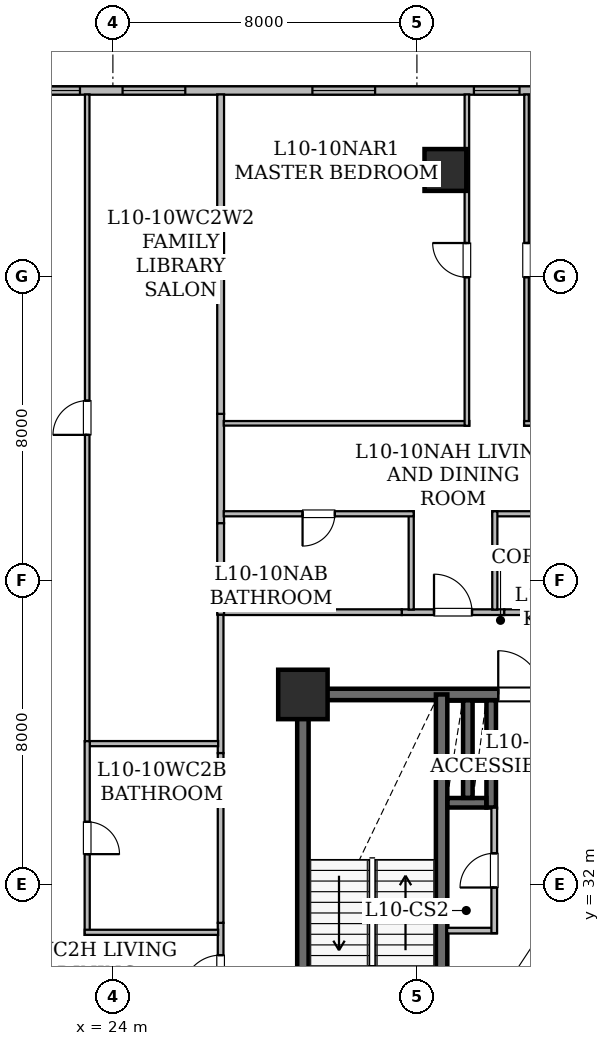
"""IFC4 building model, lengths in metres.
Left out: names, types, materials, properties, quantities, classifications, styles, units other than length and angle.
Written with IfcOpenShell. Run it as: python <this file> out.ifc"""

import sys

from ifc_helpers import new_model, si_unit, direction, frame, frame_2d, origin, origin_2d, place, context, subcontext, project, spatial, rectangle, hollow_rectangle, extrude, element, fill, save


model = new_model("IFC4")
c1 = context("Model", 3, precision=1e-05, world=origin(), true_north=direction((0.0, 1.0)))
c2 = subcontext(c1, "Body", "Model", "MODEL_VIEW")
j1 = project(units=[si_unit("LENGTHUNIT", "METRE"), si_unit("PLANEANGLEUNIT", "RADIAN")], contexts=[c1])
p1 = place(None, origin())
s1 = spatial("IfcSite", under=j1, at=p1, CompositionType="ELEMENT")
p2 = place(p1, origin())
s2 = spatial("IfcBuilding", under=s1, at=p2, CompositionType="ELEMENT")
p3 = place(p2, frame((0.0, 0.0, 44.25)))
s3 = spatial("IfcBuildingStorey", under=s2, at=p3, CompositionType="ELEMENT", Elevation=44.25)
p4 = place(p3, frame((29.0, 37.0, 0.0), z_axis=(0.0, 0.0, 1.0), x_axis=(1.0, 0.0, 0.0)))
e1 = element("IfcColumn", 1, at=p4, inside=s3, PredefinedType="COLUMN", context=c2, shape_type="SweptSolid", body=[
    extrude(hollow_rectangle(XDim=1.3, YDim=1.3, WallThickness=0.065, at=origin_2d()), origin(), (0.0, 0.0, 1.0), 3.65),
])
p5 = place(p3, frame((32.75, 50.8, 0.0), z_axis=(0.0, 0.0, 1.0), x_axis=(1.0, 0.0, 0.0)))
e2 = element("IfcColumn", 2, at=p5, inside=s3, PredefinedType="COLUMN", context=c2, shape_type="SweptSolid", body=[
    extrude(hollow_rectangle(XDim=1.1, YDim=1.1, WallThickness=0.055, at=origin_2d()), origin(), (0.0, 0.0, 1.0), 3.65),
])
p6 = place(p3, frame((8.315, 52.89, 0.0), z_axis=(0.0, 0.0, 1.0), x_axis=(1.0, 0.0, 0.0)))
e3 = element("IfcWall", 3, at=p6, inside=s3, PredefinedType="STANDARD", context=c2, shape_type="SweptSolid", body=[
    extrude(rectangle(XDim=37.439, YDim=0.22, at=frame_2d((18.719, 0.0))), origin(), (0.0, 0.0, 1.0), 3.43),
])
p7 = place(p6, frame((3.164, 0.0, 0.85)))
e4 = element("IfcOpeningElement", 4, at=p7, cuts=e3, PredefinedType="OPENING", context=c2, shape_type="SweptSolid", body=[
    extrude(rectangle(XDim=1.65, YDim=1.55, at=frame_2d((0.825, 0.775))), frame((0.0, 0.12, 0.0), z_axis=(0.0, -1.0, 0.0), x_axis=(1.0, 0.0, 0.0)), (0.0, 0.0, 1.0), 0.24),
])
p8 = place(p6, frame((15.94, 0.0, 0.85)))
e5 = element("IfcOpeningElement", 5, at=p8, cuts=e3, PredefinedType="OPENING", context=c2, shape_type="SweptSolid", body=[
    extrude(rectangle(XDim=1.65, YDim=1.55, at=frame_2d((0.825, 0.775))), frame((0.0, 0.12, 0.0), z_axis=(0.0, -1.0, 0.0), x_axis=(1.0, 0.0, 0.0)), (0.0, 0.0, 1.0), 0.24),
])
p9 = place(p6, frame((13.619, 0.0, 0.8)))
e6 = element("IfcOpeningElement", 6, at=p9, cuts=e3, PredefinedType="OPENING", context=c2, shape_type="SweptSolid", body=[
    extrude(rectangle(XDim=1.2, YDim=1.5, at=frame_2d((0.6, 0.75))), frame((0.0, 0.12, 0.0), z_axis=(0.0, -1.0, 0.0), x_axis=(1.0, 0.0, 0.0)), (0.0, 0.0, 1.0), 0.24),
])
p10 = place(p6, frame((8.999, 0.0, 0.85)))
e7 = element("IfcOpeningElement", 7, at=p10, cuts=e3, PredefinedType="OPENING", context=c2, shape_type="SweptSolid", body=[
    extrude(rectangle(XDim=1.65, YDim=1.55, at=frame_2d((0.825, 0.775))), frame((0.0, 0.12, 0.0), z_axis=(0.0, -1.0, 0.0), x_axis=(1.0, 0.0, 0.0)), (0.0, 0.0, 1.0), 0.24),
])
p11 = place(p6, frame((25.185, 0.0, 0.8)))
e8 = element("IfcOpeningElement", 8, at=p11, cuts=e3, PredefinedType="OPENING", context=c2, shape_type="SweptSolid", body=[
    extrude(rectangle(XDim=1.2, YDim=1.5, at=frame_2d((0.6, 0.75))), frame((0.0, 0.12, 0.0), z_axis=(0.0, -1.0, 0.0), x_axis=(1.0, 0.0, 0.0)), (0.0, 0.0, 1.0), 0.24),
])
p12 = place(p6, frame((20.935, 0.0, 0.85)))
e9 = element("IfcOpeningElement", 9, at=p12, cuts=e3, PredefinedType="OPENING", context=c2, shape_type="SweptSolid", body=[
    extrude(rectangle(XDim=1.65, YDim=1.55, at=frame_2d((0.825, 0.775))), frame((0.0, 0.12, 0.0), z_axis=(0.0, -1.0, 0.0), x_axis=(1.0, 0.0, 0.0)), (0.0, 0.0, 1.0), 0.24),
])
p13 = place(p6, frame((28.985, 0.0, 0.85)))
e10 = element("IfcOpeningElement", 10, at=p13, cuts=e3, PredefinedType="OPENING", context=c2, shape_type="SweptSolid", body=[
    extrude(rectangle(XDim=1.65, YDim=1.55, at=frame_2d((0.825, 0.775))), frame((0.0, 0.12, 0.0), z_axis=(0.0, -1.0, 0.0), x_axis=(1.0, 0.0, 0.0)), (0.0, 0.0, 1.0), 0.24),
])
p14 = place(p6, frame((33.98, 0.0, 0.85)))
e11 = element("IfcOpeningElement", 11, at=p14, cuts=e3, PredefinedType="OPENING", context=c2, shape_type="SweptSolid", body=[
    extrude(rectangle(XDim=1.65, YDim=1.55, at=frame_2d((0.825, 0.775))), frame((0.0, 0.12, 0.0), z_axis=(0.0, -1.0, 0.0), x_axis=(1.0, 0.0, 0.0)), (0.0, 0.0, 1.0), 0.24),
])
p15 = place(p3, frame((29.0, 28.0, 0.0), z_axis=(0.0, 0.0, 1.0), x_axis=(0.0, 1.0, 0.0)))
e12 = element("IfcWall", 12, at=p15, inside=s3, PredefinedType="SHEAR", context=c2, shape_type="SweptSolid", body=[
    extrude(rectangle(XDim=9.0, YDim=0.3, at=frame_2d((4.5, 0.0))), origin(), (0.0, 0.0, 1.0), 3.43),
])
p16 = place(p3, frame((29.0, 37.0, 0.0), z_axis=(0.0, 0.0, 1.0), x_axis=(1.0, 0.0, 0.0)))
e13 = element("IfcWall", 13, at=p16, inside=s3, PredefinedType="SHEAR", context=c2, shape_type="SweptSolid", body=[
    extrude(rectangle(XDim=10.4, YDim=0.3, at=frame_2d((5.2, 0.0))), origin(), (0.0, 0.0, 1.0), 3.43),
])
p17 = place(p16, frame((5.14, 0.0, 0.0)))
e14 = element("IfcOpeningElement", 14, at=p17, cuts=e13, PredefinedType="OPENING", context=c2, shape_type="SweptSolid", body=[
    extrude(rectangle(XDim=1.15, YDim=2.2, at=frame_2d((0.575, 1.1))), frame((0.0, 0.16, 0.0), z_axis=(0.0, -1.0, 0.0), x_axis=(1.0, 0.0, 0.0)), (0.0, 0.0, 1.0), 0.32),
])
p18 = place(p3, frame((32.65, 28.0, 0.0), z_axis=(0.0, 0.0, 1.0), x_axis=(0.0, 1.0, 0.0)))
e15 = element("IfcWall", 15, at=p18, inside=s3, PredefinedType="SHEAR", context=c2, shape_type="SweptSolid", body=[
    extrude(rectangle(XDim=9.0, YDim=0.3, at=frame_2d((4.5, 0.0))), origin(), (0.0, 0.0, 1.0), 3.43),
])
p19 = place(p18, frame((0.72, 0.0, 0.0)))
e16 = element("IfcOpeningElement", 16, at=p19, cuts=e15, PredefinedType="OPENING", context=c2, shape_type="SweptSolid", body=[
    extrude(rectangle(XDim=1.0, YDim=2.15, at=frame_2d((0.5, 1.075))), frame((0.0, 0.16, 0.0), z_axis=(0.0, -1.0, 0.0), x_axis=(1.0, 0.0, 0.0)), (0.0, 0.0, 1.0), 0.32),
])
p20 = place(p3, frame((33.955, 34.025, 0.0), z_axis=(0.0, 0.0, 1.0), x_axis=(0.0, 1.0, 0.0)))
e17 = element("IfcWall", 17, at=p20, inside=s3, PredefinedType="SHEAR", context=c2, shape_type="SweptSolid", body=[
    extrude(rectangle(XDim=2.821, YDim=0.25, at=frame_2d((1.411, 0.0))), origin(), (0.0, 0.0, 1.0), 3.43),
])
p21 = place(p3, frame((32.804, 34.15, 0.0), z_axis=(0.0, 0.0, 1.0), x_axis=(1.0, 0.0, 0.0)))
e18 = element("IfcWall", 18, at=p21, inside=s3, PredefinedType="SHEAR", context=c2, shape_type="SweptSolid", body=[
    extrude(rectangle(XDim=1.022, YDim=0.25, at=frame_2d((0.511, 0.0))), origin(), (0.0, 0.0, 1.0), 3.43),
])
p22 = place(p3, frame((33.34, 34.279, 0.0), z_axis=(0.0, 0.0, 1.0), x_axis=(0.0, 1.0, 0.0)))
e19 = element("IfcWall", 19, at=p22, inside=s3, PredefinedType="SHEAR", context=c2, shape_type="SweptSolid", body=[
    extrude(rectangle(XDim=2.567, YDim=0.25, at=frame_2d((1.283, 0.0))), origin(), (0.0, 0.0, 1.0), 3.43),
])
p23 = place(p3, frame((32.794, 30.785, 0.0), z_axis=(0.0, 0.0, 1.0), x_axis=(1.0, 0.0, 0.0)))
e20 = element("IfcWall", 20, at=p23, inside=s3, PredefinedType="STANDARD", context=c2, shape_type="SweptSolid", body=[
    extrude(rectangle(XDim=1.306, YDim=0.15, at=frame_2d((0.653, 0.0))), origin(), (0.0, 0.0, 1.0), 2.887),
])
p24 = place(p3, frame((34.035, 30.72, 0.0), z_axis=(0.0, 0.0, 1.0), x_axis=(0.0, 1.0, 0.0)))
e21 = element("IfcWall", 21, at=p24, inside=s3, PredefinedType="STANDARD", context=c2, shape_type="SweptSolid", body=[
    extrude(rectangle(XDim=3.3, YDim=0.15, at=frame_2d((1.65, 0.0))), origin(), (0.0, 0.0, 1.0), 3.43),
])
p25 = place(p24, frame((1.2, 0.0, 0.0)))
e22 = element("IfcOpeningElement", 22, at=p25, cuts=e21, PredefinedType="OPENING", context=c2, shape_type="SweptSolid", body=[
    extrude(rectangle(XDim=0.9, YDim=2.1, at=frame_2d((0.45, 1.05))), frame((0.0, 0.085, 0.0), z_axis=(0.0, -1.0, 0.0), x_axis=(1.0, 0.0, 0.0)), (0.0, 0.0, 1.0), 0.17),
])
p26 = place(p3, frame((26.835, 35.457, 0.0), z_axis=(0.0, 0.0, 1.0), x_axis=(0.0, 1.0, 0.0)))
e23 = element("IfcWall", 23, at=p26, inside=s3, PredefinedType="STANDARD", context=c2, shape_type="SweptSolid", body=[
    extrude(rectangle(XDim=3.643, YDim=0.15, at=frame_2d((1.822, 0.0))), origin(), (0.0, 0.0, 1.0), 2.647),
])
p27 = place(p3, frame((26.835, 28.292, 0.0), z_axis=(0.0, 0.0, 1.0), x_axis=(0.0, 1.0, 0.0)))
e24 = element("IfcWall", 24, at=p27, inside=s3, PredefinedType="STANDARD", context=c2, shape_type="SweptSolid", body=[
    extrude(rectangle(XDim=2.698, YDim=0.15, at=frame_2d((1.349, 0.0))), origin(), (0.0, 0.0, 1.0), 3.43),
])
p28 = place(p27, frame((0.849, 0.0, 0.0)))
e25 = element("IfcOpeningElement", 25, at=p28, cuts=e24, PredefinedType="OPENING", context=c2, shape_type="SweptSolid", body=[
    extrude(rectangle(XDim=1.0, YDim=2.15, at=frame_2d((0.5, 1.075))), frame((0.0, 0.085, 0.0), z_axis=(0.0, -1.0, 0.0), x_axis=(1.0, 0.0, 0.0)), (0.0, 0.0, 1.0), 0.17),
])
p29 = place(p3, frame((26.835, 30.99, 0.0), z_axis=(0.0, 0.0, 1.0), x_axis=(0.0, 1.0, 0.0)))
e26 = element("IfcWall", 26, at=p29, inside=s3, PredefinedType="STANDARD", context=c2, shape_type="SweptSolid", body=[
    extrude(rectangle(XDim=4.467, YDim=0.15, at=frame_2d((2.233, 0.0))), origin(), (0.0, 0.0, 1.0), 3.43),
])
p30 = place(p3, frame((31.601, 39.165, 0.0), z_axis=(0.0, 0.0, 1.0), x_axis=(1.0, 0.0, 0.0)))
e27 = element("IfcWall", 27, at=p30, inside=s3, PredefinedType="STANDARD", context=c2, shape_type="SweptSolid", body=[
    extrude(rectangle(XDim=2.698, YDim=0.15, at=frame_2d((1.349, 0.0))), origin(), (0.0, 0.0, 1.0), 3.43),
])
p31 = place(p30, frame((0.849, 0.0, 0.0)))
e28 = element("IfcOpeningElement", 28, at=p31, cuts=e27, PredefinedType="OPENING", context=c2, shape_type="SweptSolid", body=[
    extrude(rectangle(XDim=1.0, YDim=2.15, at=frame_2d((0.5, 1.075))), frame((0.0, 0.085, 0.0), z_axis=(0.0, -1.0, 0.0), x_axis=(1.0, 0.0, 0.0)), (0.0, 0.0, 1.0), 0.17),
])
p32 = place(p3, frame((26.9, 39.165, 0.0), z_axis=(0.0, 0.0, 1.0), x_axis=(1.0, 0.0, 0.0)))
e29 = element("IfcWall", 29, at=p32, inside=s3, PredefinedType="STANDARD", context=c2, shape_type="SweptSolid", body=[
    extrude(rectangle(XDim=4.701, YDim=0.15, at=frame_2d((2.351, 0.0))), origin(), (0.0, 0.0, 1.0), 2.647),
])
p33 = place(p3, frame((34.299, 39.165, 0.0), z_axis=(0.0, 0.0, 1.0), x_axis=(1.0, 0.0, 0.0)))
e30 = element("IfcWall", 30, at=p33, inside=s3, PredefinedType="STANDARD", context=c2, shape_type="SweptSolid", body=[
    extrude(rectangle(XDim=7.001, YDim=0.15, at=frame_2d((3.5, 0.0))), origin(), (0.0, 0.0, 1.0), 3.43),
])
p34 = place(p3, frame((23.324, 35.771, 0.0), z_axis=(0.0, 0.0, 1.0), x_axis=(0.0, 1.0, 0.0)))
e31 = element("IfcWall", 31, at=p34, inside=s3, PredefinedType="PARTITIONING", context=c2, shape_type="SweptSolid", body=[
    extrude(rectangle(XDim=17.017, YDim=0.12, at=frame_2d((8.509, 0.0))), origin(), (0.0, 0.0, 1.0), 2.647),
])
p35 = place(p34, frame((8.059, 0.0, 0.0)))
e32 = element("IfcOpeningElement", 32, at=p35, cuts=e31, PredefinedType="OPENING", context=c2, shape_type="SweptSolid", body=[
    extrude(rectangle(XDim=0.9, YDim=2.1, at=frame_2d((0.45, 1.05))), frame((0.0, 0.07, 0.0), z_axis=(0.0, -1.0, 0.0), x_axis=(1.0, 0.0, 0.0)), (0.0, 0.0, 1.0), 0.14),
])
p36 = place(p3, frame((26.77, 35.706, 0.0), z_axis=(0.0, 0.0, 1.0), x_axis=(-1.0, 0.0, 0.0)))
e33 = element("IfcWall", 33, at=p36, inside=s3, PredefinedType="PARTITIONING", context=c2, shape_type="SweptSolid", body=[
    extrude(rectangle(XDim=3.381, YDim=0.135, at=frame_2d((1.69, 0.0))), origin(), (0.0, 0.0, 1.0), 3.43),
])
p37 = place(p3, frame((26.835, 44.383, 0.0), z_axis=(0.0, 0.0, 1.0), x_axis=(0.0, -1.0, 0.0)))
e34 = element("IfcWall", 34, at=p37, inside=s3, PredefinedType="STANDARD", context=c2, shape_type="SweptSolid", body=[
    extrude(rectangle(XDim=2.878, YDim=0.18, at=frame_2d((1.439, 0.0))), origin(), (0.0, 0.0, 1.0), 2.957),
])
p38 = place(p3, frame((26.835, 41.505, 0.0), z_axis=(0.0, 0.0, 1.0), x_axis=(0.0, -1.0, 0.0)))
e35 = element("IfcWall", 35, at=p38, inside=s3, PredefinedType="STANDARD", context=c2, shape_type="SweptSolid", body=[
    extrude(rectangle(XDim=2.405, YDim=0.18, at=frame_2d((1.202, 0.0))), origin(), (0.0, 0.0, 1.0), 3.43),
])
p39 = place(p3, frame((26.835, 52.788, 0.0), z_axis=(0.0, 0.0, 1.0), x_axis=(0.0, -1.0, 0.0)))
e36 = element("IfcWall", 36, at=p39, inside=s3, PredefinedType="STANDARD", context=c2, shape_type="SweptSolid", body=[
    extrude(rectangle(XDim=8.405, YDim=0.18, at=frame_2d((4.203, 0.0))), origin(), (0.0, 0.0, 1.0), 2.803),
])
p40 = place(p3, frame((23.324, 35.771, 0.0), z_axis=(0.0, 0.0, 1.0), x_axis=(0.0, -1.0, 0.0)))
e37 = element("IfcWall", 37, at=p40, inside=s3, PredefinedType="PARTITIONING", context=c2, shape_type="SweptSolid", body=[
    extrude(rectangle(XDim=5.095, YDim=0.135, at=frame_2d((2.547, 0.0))), origin(), (0.0, 0.0, 1.0), 3.43),
])
p41 = place(p40, frame((2.123, 0.0, 0.0)))
e38 = element("IfcOpeningElement", 38, at=p41, cuts=e37, PredefinedType="OPENING", context=c2, shape_type="SweptSolid", body=[
    extrude(rectangle(XDim=0.85, YDim=2.1, at=frame_2d((0.425, 1.05))), frame((0.0, 0.077, 0.0), z_axis=(0.0, -1.0, 0.0), x_axis=(1.0, 0.0, 0.0)), (0.0, 0.0, 1.0), 0.155),
])
p42 = place(p3, frame((23.259, 30.741, 0.0), z_axis=(0.0, 0.0, 1.0), x_axis=(1.0, 0.0, 0.0)))
e39 = element("IfcWall", 39, at=p42, inside=s3, PredefinedType="PARTITIONING", context=c2, shape_type="SweptSolid", body=[
    extrude(rectangle(XDim=3.511, YDim=0.135, at=frame_2d((1.755, 0.0))), origin(), (0.0, 0.0, 1.0), 3.43),
])
p43 = place(p3, frame((31.85, 39.232, 0.0), z_axis=(0.0, 0.0, 1.0), x_axis=(0.0, 1.0, 0.0)))
e40 = element("IfcWall", 40, at=p43, inside=s3, PredefinedType="PARTITIONING", context=c2, shape_type="SweptSolid", body=[
    extrude(rectangle(XDim=2.587, YDim=0.135, at=frame_2d((1.293, 0.0))), origin(), (0.0, 0.0, 1.0), 3.43),
])
p44 = place(p3, frame((31.915, 41.754, 0.0), z_axis=(0.0, 0.0, 1.0), x_axis=(-1.0, 0.0, 0.0)))
e41 = element("IfcWall", 41, at=p44, inside=s3, PredefinedType="PARTITIONING", context=c2, shape_type="SweptSolid", body=[
    extrude(rectangle(XDim=4.998, YDim=0.135, at=frame_2d((2.499, 0.0))), origin(), (0.0, 0.0, 1.0), 2.647),
])
p45 = place(p44, frame((2.074, 0.0, 0.0)))
e42 = element("IfcOpeningElement", 42, at=p45, cuts=e41, PredefinedType="OPENING", context=c2, shape_type="SweptSolid", body=[
    extrude(rectangle(XDim=0.85, YDim=2.1, at=frame_2d((0.425, 1.05))), frame((0.0, 0.077, 0.0), z_axis=(0.0, -1.0, 0.0), x_axis=(1.0, 0.0, 0.0)), (0.0, 0.0, 1.0), 0.155),
])
p46 = place(p3, frame((41.3, 41.754, 0.0), z_axis=(0.0, 0.0, 1.0), x_axis=(-1.0, 0.0, 0.0)))
e43 = element("IfcWall", 43, at=p46, inside=s3, PredefinedType="PARTITIONING", context=c2, shape_type="SweptSolid", body=[
    extrude(rectangle(XDim=7.315, YDim=0.135, at=frame_2d((3.657, 0.0))), origin(), (0.0, 0.0, 1.0), 3.43),
])
p47 = place(p46, frame((3.233, 0.0, 0.0)))
e44 = element("IfcOpeningElement", 44, at=p47, cuts=e43, PredefinedType="OPENING", context=c2, shape_type="SweptSolid", body=[
    extrude(rectangle(XDim=0.85, YDim=2.1, at=frame_2d((0.425, 1.05))), frame((0.0, 0.077, 0.0), z_axis=(0.0, -1.0, 0.0), x_axis=(1.0, 0.0, 0.0)), (0.0, 0.0, 1.0), 0.155),
])
p48 = place(p3, frame((34.05, 41.819, 0.0), z_axis=(0.0, 0.0, 1.0), x_axis=(0.0, -1.0, 0.0)))
e45 = element("IfcWall", 45, at=p48, inside=s3, PredefinedType="PARTITIONING", context=c2, shape_type="SweptSolid", body=[
    extrude(rectangle(XDim=2.587, YDim=0.135, at=frame_2d((1.293, 0.0))), origin(), (0.0, 0.0, 1.0), 3.43),
])
p49 = place(p3, frame((26.917, 44.134, 0.0), z_axis=(0.0, 0.0, 1.0), x_axis=(1.0, 0.0, 0.0)))
e46 = element("IfcWall", 46, at=p49, inside=s3, PredefinedType="PARTITIONING", context=c2, shape_type="SweptSolid", body=[
    extrude(rectangle(XDim=6.463, YDim=0.12, at=frame_2d((3.231, 0.0))), origin(), (0.0, 0.0, 1.0), 2.647),
])
p50 = place(p3, frame((33.315, 44.069, 0.0), z_axis=(0.0, 0.0, 1.0), x_axis=(0.0, 1.0, 0.0)))
e47 = element("IfcWall", 47, at=p50, inside=s3, PredefinedType="PARTITIONING", context=c2, shape_type="SweptSolid", body=[
    extrude(rectangle(XDim=8.719, YDim=0.12, at=frame_2d((4.359, 0.0))), origin(), (0.0, 0.0, 1.0), 2.803),
])
p51 = place(p50, frame((3.909, 0.0, 0.0)))
e48 = element("IfcOpeningElement", 48, at=p51, cuts=e47, PredefinedType="OPENING", context=c2, shape_type="SweptSolid", body=[
    extrude(rectangle(XDim=0.9, YDim=2.1, at=frame_2d((0.45, 1.05))), frame((0.0, 0.07, 0.0), z_axis=(0.0, -1.0, 0.0), x_axis=(1.0, 0.0, 0.0)), (0.0, 0.0, 1.0), 0.14),
])
p52 = place(p3, frame((34.885, 52.788, 0.0), z_axis=(0.0, 0.0, 1.0), x_axis=(0.0, -1.0, 0.0)))
e49 = element("IfcWall", 49, at=p52, inside=s3, PredefinedType="PARTITIONING", context=c2, shape_type="SweptSolid", body=[
    extrude(rectangle(XDim=8.719, YDim=0.12, at=frame_2d((4.359, 0.0))), origin(), (0.0, 0.0, 1.0), 2.803),
])
p53 = place(p52, frame((3.909, 0.0, 0.0)))
e50 = element("IfcOpeningElement", 50, at=p53, cuts=e49, PredefinedType="OPENING", context=c2, shape_type="SweptSolid", body=[
    extrude(rectangle(XDim=0.9, YDim=2.1, at=frame_2d((0.45, 1.05))), frame((0.0, 0.07, 0.0), z_axis=(0.0, -1.0, 0.0), x_axis=(1.0, 0.0, 0.0)), (0.0, 0.0, 1.0), 0.14),
])
p54 = place(p3, frame((34.82, 44.134, 0.0), z_axis=(0.0, 0.0, 1.0), x_axis=(1.0, 0.0, 0.0)))
e51 = element("IfcWall", 51, at=p54, inside=s3, PredefinedType="PARTITIONING", context=c2, shape_type="SweptSolid", body=[
    extrude(rectangle(XDim=6.48, YDim=0.12, at=frame_2d((3.24, 0.0))), origin(), (0.0, 0.0, 1.0), 3.43),
])
p55 = place(p8, origin())
e52 = element("IfcWindow", 52, at=p55, inside=s3, PartitioningType="SINGLE_PANEL", PredefinedType="WINDOW", context=c2, shape_type="SweptSolid", body=[
    extrude(rectangle(XDim=1.65, YDim=1.55, at=frame_2d((0.825, 0.775))), frame((0.0, 0.03, 0.0), z_axis=(0.0, -1.0, 0.0), x_axis=(1.0, 0.0, 0.0)), (0.0, 0.0, 1.0), 0.06),
])
fill(e5, e52)
p56 = place(p9, origin())
e53 = element("IfcWindow", 53, at=p56, inside=s3, PartitioningType="SINGLE_PANEL", PredefinedType="WINDOW", context=c2, shape_type="SweptSolid", body=[
    extrude(rectangle(XDim=1.2, YDim=1.5, at=frame_2d((0.6, 0.75))), frame((0.0, 0.03, 0.0), z_axis=(0.0, -1.0, 0.0), x_axis=(1.0, 0.0, 0.0)), (0.0, 0.0, 1.0), 0.06),
])
fill(e6, e53)
p57 = place(p11, origin())
e54 = element("IfcWindow", 54, at=p57, inside=s3, PartitioningType="SINGLE_PANEL", PredefinedType="WINDOW", context=c2, shape_type="SweptSolid", body=[
    extrude(rectangle(XDim=1.2, YDim=1.5, at=frame_2d((0.6, 0.75))), frame((0.0, 0.03, 0.0), z_axis=(0.0, -1.0, 0.0), x_axis=(1.0, 0.0, 0.0)), (0.0, 0.0, 1.0), 0.06),
])
fill(e8, e54)
p58 = place(p12, origin())
e55 = element("IfcWindow", 55, at=p58, inside=s3, PartitioningType="SINGLE_PANEL", PredefinedType="WINDOW", context=c2, shape_type="SweptSolid", body=[
    extrude(rectangle(XDim=1.65, YDim=1.55, at=frame_2d((0.825, 0.775))), frame((0.0, 0.03, 0.0), z_axis=(0.0, -1.0, 0.0), x_axis=(1.0, 0.0, 0.0)), (0.0, 0.0, 1.0), 0.06),
])
fill(e9, e55)
p59 = place(p17, origin())
e56 = element("IfcDoor", 56, at=p59, inside=s3, OperationType="SINGLE_SWING_LEFT", PredefinedType="DOOR", context=c2, shape_type="SweptSolid", body=[
    extrude(rectangle(XDim=1.15, YDim=2.2, at=frame_2d((0.575, 1.1))), frame((0.0, 0.025, 0.0), z_axis=(0.0, -1.0, 0.0), x_axis=(1.0, 0.0, 0.0)), (0.0, 0.0, 1.0), 0.05),
])
fill(e14, e56)
p60 = place(p25, origin())
e57 = element("IfcDoor", 57, at=p60, inside=s3, OperationType="SINGLE_SWING_LEFT", PredefinedType="DOOR", context=c2, shape_type="SweptSolid", body=[
    extrude(rectangle(XDim=0.9, YDim=2.1, at=frame_2d((0.45, 1.05))), frame((0.0, 0.025, 0.0), z_axis=(0.0, -1.0, 0.0), x_axis=(1.0, 0.0, 0.0)), (0.0, 0.0, 1.0), 0.05),
])
fill(e22, e57)
p61 = place(p28, origin())
e58 = element("IfcDoor", 58, at=p61, inside=s3, OperationType="SINGLE_SWING_LEFT", PredefinedType="DOOR", context=c2, shape_type="SweptSolid", body=[
    extrude(rectangle(XDim=1.0, YDim=2.15, at=frame_2d((0.5, 1.075))), frame((0.0, 0.025, 0.0), z_axis=(0.0, -1.0, 0.0), x_axis=(1.0, 0.0, 0.0)), (0.0, 0.0, 1.0), 0.05),
])
fill(e25, e58)
p62 = place(p31, origin())
e59 = element("IfcDoor", 59, at=p62, inside=s3, OperationType="SINGLE_SWING_LEFT", PredefinedType="DOOR", context=c2, shape_type="SweptSolid", body=[
    extrude(rectangle(XDim=1.0, YDim=2.15, at=frame_2d((0.5, 1.075))), frame((0.0, 0.025, 0.0), z_axis=(0.0, -1.0, 0.0), x_axis=(1.0, 0.0, 0.0)), (0.0, 0.0, 1.0), 0.05),
])
fill(e28, e59)
p63 = place(p35, origin())
e60 = element("IfcDoor", 60, at=p63, inside=s3, OperationType="SINGLE_SWING_LEFT", PredefinedType="DOOR", context=c2, shape_type="SweptSolid", body=[
    extrude(rectangle(XDim=0.9, YDim=2.1, at=frame_2d((0.45, 1.05))), frame((0.0, 0.025, 0.0), z_axis=(0.0, -1.0, 0.0), x_axis=(1.0, 0.0, 0.0)), (0.0, 0.0, 1.0), 0.05),
])
fill(e32, e60)
p64 = place(p41, origin())
e61 = element("IfcDoor", 61, at=p64, inside=s3, OperationType="SINGLE_SWING_RIGHT", PredefinedType="DOOR", context=c2, shape_type="SweptSolid", body=[
    extrude(rectangle(XDim=0.85, YDim=2.1, at=frame_2d((0.425, 1.05))), frame((0.0, 0.025, 0.0), z_axis=(0.0, -1.0, 0.0), x_axis=(1.0, 0.0, 0.0)), (0.0, 0.0, 1.0), 0.05),
])
fill(e38, e61)
p65 = place(p45, origin())
e62 = element("IfcDoor", 62, at=p65, inside=s3, OperationType="SINGLE_SWING_RIGHT", PredefinedType="DOOR", context=c2, shape_type="SweptSolid", body=[
    extrude(rectangle(XDim=0.85, YDim=2.1, at=frame_2d((0.425, 1.05))), frame((0.0, 0.025, 0.0), z_axis=(0.0, -1.0, 0.0), x_axis=(1.0, 0.0, 0.0)), (0.0, 0.0, 1.0), 0.05),
])
fill(e42, e62)
p66 = place(p51, origin())
e63 = element("IfcDoor", 63, at=p66, inside=s3, OperationType="SINGLE_SWING_RIGHT", PredefinedType="DOOR", context=c2, shape_type="SweptSolid", body=[
    extrude(rectangle(XDim=0.9, YDim=2.1, at=frame_2d((0.45, 1.05))), frame((0.0, 0.025, 0.0), z_axis=(0.0, -1.0, 0.0), x_axis=(1.0, 0.0, 0.0)), (0.0, 0.0, 1.0), 0.05),
])
fill(e48, e63)
p67 = place(p53, origin())
e64 = element("IfcDoor", 64, at=p67, inside=s3, OperationType="SINGLE_SWING_LEFT", PredefinedType="DOOR", context=c2, shape_type="SweptSolid", body=[
    extrude(rectangle(XDim=0.9, YDim=2.1, at=frame_2d((0.45, 1.05))), frame((0.0, 0.025, 0.0), z_axis=(0.0, -1.0, 0.0), x_axis=(1.0, 0.0, 0.0)), (0.0, 0.0, 1.0), 0.05),
])
fill(e50, e64)
save(model, sys.argv[1])
